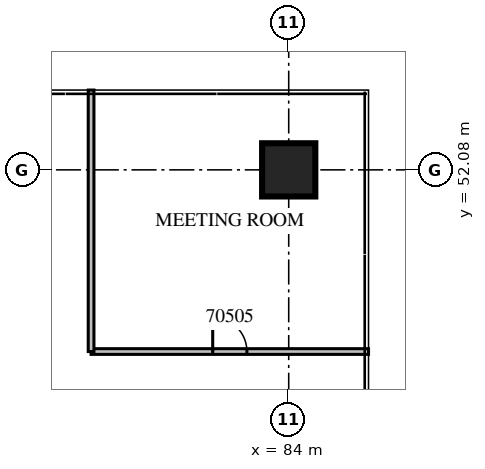
"""IFC4 building model, lengths in metres.
Left out: names, types, materials, properties, quantities, classifications, styles, units other than length and angle.
Written with IfcOpenShell. Run it as: python <this file> out.ifc"""

import sys

from ifc_helpers import new_model, si_unit, direction, frame, frame_2d, origin, origin_2d, place, context, subcontext, project, spatial, rectangle, extrude, source, transform, mapped, element, fill, save


model = new_model("IFC4")
c1 = context("Model", 3, precision=1e-05, world=origin(), true_north=direction((0.0, 1.0)))
c2 = subcontext(c1, "Body", "Model", "MODEL_VIEW")
j1 = project(units=[si_unit("LENGTHUNIT", "METRE"), si_unit("PLANEANGLEUNIT", "RADIAN")], contexts=[c1])
p1 = place(None, origin())
s1 = spatial("IfcSite", under=j1, at=p1, CompositionType="ELEMENT")
p2 = place(p1, origin())
s2 = spatial("IfcBuilding", under=s1, at=p2, CompositionType="ELEMENT")
p3 = place(p2, frame((0.0, 0.0, 12.9)))
s3 = spatial("IfcBuildingStorey", under=s2, at=p3, CompositionType="ELEMENT", Elevation=12.9)
m1 = source(origin(), c2, "Body", "SweptSolid", [
    extrude(rectangle(XDim=1.4, YDim=1.4, at=origin_2d()), origin(), (0.0, 0.0, 1.0), 5.4),
])
p4 = place(p3, frame((84.0, 52.08, 0.0), z_axis=(0.0, 0.0, 1.0), x_axis=(1.0, 0.0, 0.0)))
e1 = element("IfcColumn", 1, at=p4, inside=s3, PredefinedType="COLUMN", context=c2, shape_type="MappedRepresentation", body=[
    mapped(m1, transform((0.0, 0.0, 0.0), scale=1.0)),
])
m2 = source(origin(), c2, "Body", "SweptSolid", [
    extrude(rectangle(XDim=7.3, YDim=0.15, at=frame_2d((3.65, 0.0))), origin(), (0.0, 0.0, 1.0), 4.8),
])
p5 = place(p3, frame((78.8, 47.3, 0.0), z_axis=(0.0, 0.0, 1.0), x_axis=(1.0, 0.0, 0.0)))
e2 = element("IfcWall", 2, at=p5, inside=s3, PredefinedType="PARTITIONING", context=c2, shape_type="MappedRepresentation", body=[
    mapped(m2, transform((0.0, 0.0, 0.0), scale=1.0)),
])
m3 = source(origin(), c2, "Body", "SweptSolid", [
    extrude(rectangle(XDim=0.9, YDim=2.1, at=frame_2d((0.45, 1.05))), frame((0.0, 0.085, 0.0), z_axis=(0.0, -1.0, 0.0), x_axis=(1.0, 0.0, 0.0)), (0.0, 0.0, 1.0), 0.17),
])
p6 = place(p5, frame((3.2, 0.0, 0.0)))
e3 = element("IfcOpeningElement", 3, at=p6, cuts=e2, PredefinedType="OPENING", context=c2, shape_type="MappedRepresentation", body=[
    mapped(m3, transform((0.0, 0.0, 0.0), scale=1.0)),
])
m4 = source(origin(), c2, "Body", "SweptSolid", [
    extrude(rectangle(XDim=6.88, YDim=0.15, at=frame_2d((3.44, 0.0))), origin(), (0.0, 0.0, 1.0), 4.8),
])
p7 = place(p3, frame((78.8, 47.3, 0.0), z_axis=(0.0, 0.0, 1.0), x_axis=(0.0, 1.0, 0.0)))
e4 = element("IfcWall", 4, at=p7, inside=s3, PredefinedType="PARTITIONING", context=c2, shape_type="MappedRepresentation", body=[
    mapped(m4, transform((0.0, 0.0, 0.0), scale=1.0)),
])
m5 = source(origin(), c2, "Body", "SweptSolid", [
    extrude(rectangle(XDim=0.9, YDim=2.1, at=frame_2d((0.45, 1.05))), frame((0.0, 0.025, 0.0), z_axis=(0.0, -1.0, 0.0), x_axis=(1.0, 0.0, 0.0)), (0.0, 0.0, 1.0), 0.05),
])
p8 = place(p6, origin())
e5 = element("IfcDoor", 5, at=p8, inside=s3, OperationType="SINGLE_SWING_LEFT", PredefinedType="DOOR", context=c2, shape_type="MappedRepresentation", body=[
    mapped(m5, transform((0.0, 0.0, 0.0), scale=1.0)),
])
fill(e3, e5)
save(model, sys.argv[1])
